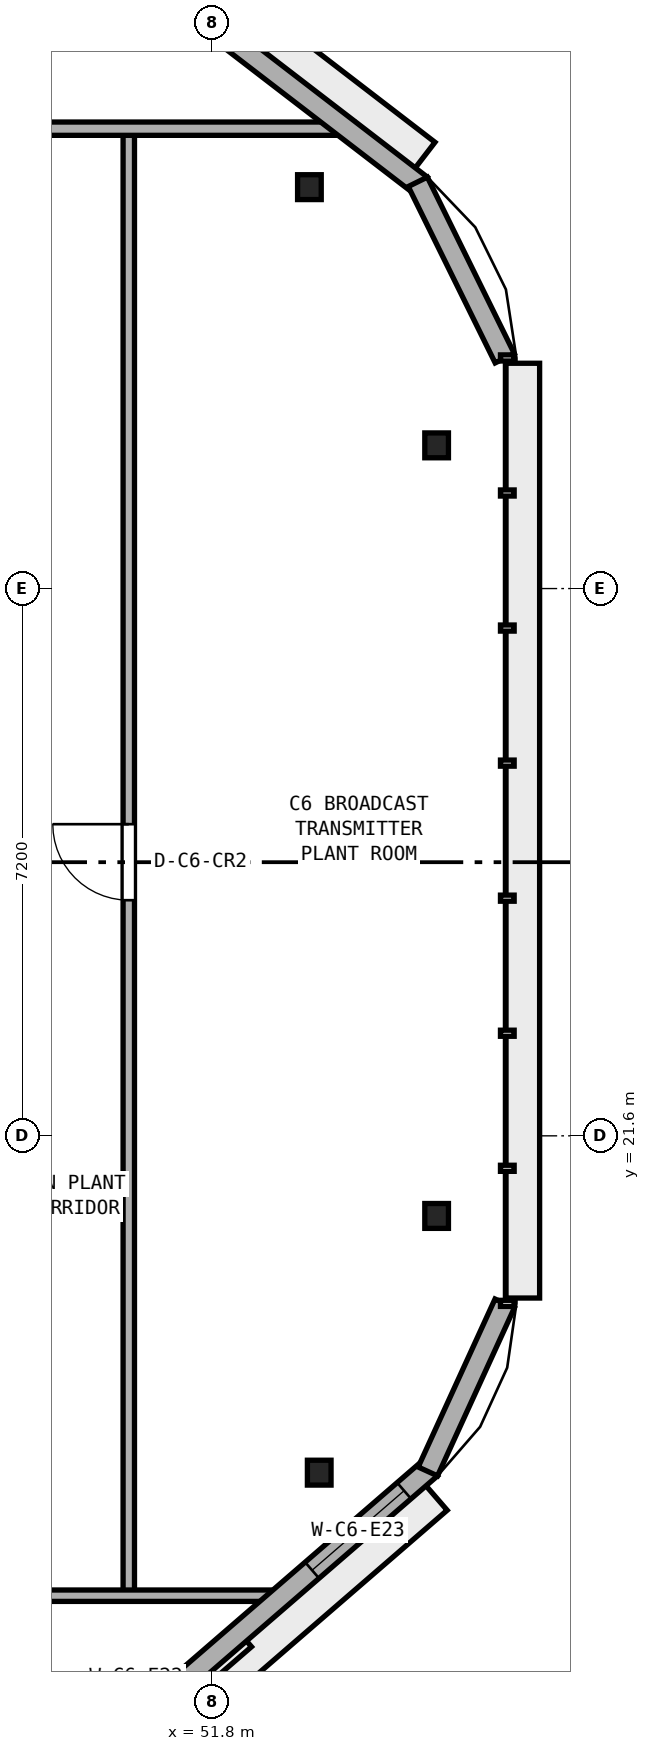
"""IFC4 building model, lengths in metres.
Left out: names, types, materials, properties, quantities, classifications, styles, units other than length and angle.
Written with IfcOpenShell. Run it as: python <this file> out.ifc"""

import sys

from ifc_helpers import new_model, si_unit, direction, frame, frame_2d, origin, origin_2d, place, context, subcontext, project, spatial, rectangle, i_section, extrude, element, fill, save


model = new_model("IFC4")
c1 = context("Model", 3, precision=1e-05, world=origin(), true_north=direction((0.0, 1.0)))
c2 = subcontext(c1, "Body", "Model", "MODEL_VIEW")
j1 = project(units=[si_unit("LENGTHUNIT", "METRE"), si_unit("PLANEANGLEUNIT", "RADIAN")], contexts=[c1])
p1 = place(None, origin())
s1 = spatial("IfcSite", under=j1, at=p1, CompositionType="ELEMENT")
p2 = place(p1, origin())
s2 = spatial("IfcBuilding", under=s1, at=p2, CompositionType="ELEMENT")
p3 = place(p2, frame((0.0, 0.0, 333.4)))
s3 = spatial("IfcBuildingStorey", under=s2, at=p3, CompositionType="ELEMENT", Elevation=333.4)
for number, where, z_axis, x_axis in (
    (1, (53.205, 17.169, 0.0), (0.0, 0.0, 1.0), (1.0, 0.0, 0.0)),
    (2, (54.75, 20.546, 0.0), (0.0, 0.0, 1.0), (1.0, 0.0, 0.0)),
    (3, (54.75, 30.684, 0.0), (0.0, 0.0, 1.0), (1.0, 0.0, 0.0)),
    (4, (53.076, 34.081, 0.0), (0.0, 0.0, 1.0), (1.0, 0.0, 0.0)),
):
    element("IfcColumn", number, at=place(p3, frame(where, z_axis=z_axis, x_axis=x_axis)), inside=s3, PredefinedType="COLUMN", context=c2, shape_type="SweptSolid", body=[
        extrude(i_section(OverallWidth=0.311, OverallDepth=0.327, WebThickness=0.016, FlangeThickness=0.025, at=origin_2d()), origin(), (0.0, 0.0, 1.0), 4.0),
    ])
p4 = place(p3, frame((50.7, 15.55, 0.0), z_axis=(0.0, 0.0, 1.0), x_axis=(0.0, 1.0, 0.0)))
e5 = element("IfcWall", 5, at=p4, inside=s3, PredefinedType="PARTITIONING", context=c2, shape_type="SweptSolid", body=[
    extrude(rectangle(XDim=19.3, YDim=0.15, at=frame_2d((9.65, 0.0))), origin(), (0.0, 0.0, 1.0), 3.7),
])
p5 = place(p4, frame((9.15, 0.0, 0.0)))
e6 = element("IfcOpeningElement", 6, at=p5, cuts=e5, PredefinedType="OPENING", context=c2, shape_type="SweptSolid", body=[
    extrude(rectangle(XDim=1.0, YDim=2.12, at=frame_2d((0.5, 1.06))), frame((0.0, 0.085, 0.0), z_axis=(0.0, -1.0, 0.0), x_axis=(1.0, 0.0, 0.0)), (0.0, 0.0, 1.0), 0.17),
])
p6 = place(p3, frame((28.818, 15.55, 0.0), z_axis=(0.0, 0.0, 1.0), x_axis=(1.0, 0.0, 0.0)))
e7 = element("IfcWall", 7, at=p6, inside=s3, PredefinedType="PARTITIONING", context=c2, shape_type="SweptSolid", body=[
    extrude(rectangle(XDim=23.98, YDim=0.15, at=frame_2d((11.99, 0.0))), origin(), (0.0, 0.0, 1.0), 3.7),
])
p7 = place(p6, frame((10.583, 0.0, 0.0)))
e8 = element("IfcOpeningElement", 8, at=p7, cuts=e7, PredefinedType="OPENING", context=c2, shape_type="SweptSolid", body=[
    extrude(rectangle(XDim=1.0, YDim=2.12, at=frame_2d((0.5, 1.06))), frame((0.0, 0.085, 0.0), z_axis=(0.0, -1.0, 0.0), x_axis=(1.0, 0.0, 0.0)), (0.0, 0.0, 1.0), 0.17),
])
p8 = place(p3, frame((29.236, 34.85, 0.0), z_axis=(0.0, 0.0, 1.0), x_axis=(1.0, 0.0, 0.0)))
e9 = element("IfcWall", 9, at=p8, inside=s3, PredefinedType="PARTITIONING", context=c2, shape_type="SweptSolid", body=[
    extrude(rectangle(XDim=24.422, YDim=0.175, at=frame_2d((12.211, 0.0))), origin(), (0.0, 0.0, 1.0), 3.7),
])
p9 = place(p8, frame((10.365, 0.0, 0.0)))
e10 = element("IfcOpeningElement", 10, at=p9, cuts=e9, PredefinedType="OPENING", context=c2, shape_type="SweptSolid", body=[
    extrude(rectangle(XDim=1.0, YDim=2.12, at=frame_2d((0.5, 1.06))), frame((0.0, 0.097, 0.0), z_axis=(0.0, -1.0, 0.0), x_axis=(1.0, 0.0, 0.0)), (0.0, 0.0, 1.0), 0.195),
])
p10 = place(p3, frame((46.921, 10.533, 0.0), z_axis=(0.0, 0.0, 1.0), x_axis=(0.756489047049, 0.654006362121, 0.0)))
e11 = element("IfcWall", 11, at=p10, inside=s3, PredefinedType="STANDARD", context=c2, shape_type="SweptSolid", body=[
    extrude(rectangle(XDim=10.244, YDim=0.28, at=frame_2d((5.122, 0.0))), origin(), (0.0, 0.0, 1.0), 3.7),
])
p11 = place(p10, frame((1.24, 0.0, 0.9)))
e12 = element("IfcOpeningElement", 12, at=p11, cuts=e11, PredefinedType="OPENING", context=c2, shape_type="SweptSolid", body=[
    extrude(rectangle(XDim=1.6, YDim=1.45, at=frame_2d((0.8, 0.725))), frame((0.0, 0.15, 0.0), z_axis=(0.0, -1.0, 0.0), x_axis=(1.0, 0.0, 0.0)), (0.0, 0.0, 1.0), 0.3),
])
p12 = place(p10, frame((4.322, 0.0, 0.9)))
e13 = element("IfcOpeningElement", 13, at=p12, cuts=e11, PredefinedType="OPENING", context=c2, shape_type="SweptSolid", body=[
    extrude(rectangle(XDim=1.6, YDim=1.45, at=frame_2d((0.8, 0.725))), frame((0.0, 0.15, 0.0), z_axis=(0.0, -1.0, 0.0), x_axis=(1.0, 0.0, 0.0)), (0.0, 0.0, 1.0), 0.3),
])
p13 = place(p10, frame((8.183, 0.0, 0.9)))
e14 = element("IfcOpeningElement", 14, at=p13, cuts=e11, PredefinedType="OPENING", context=c2, shape_type="SweptSolid", body=[
    extrude(rectangle(XDim=1.6, YDim=1.45, at=frame_2d((0.8, 0.725))), frame((0.0, 0.15, 0.0), z_axis=(0.0, -1.0, 0.0), x_axis=(1.0, 0.0, 0.0)), (0.0, 0.0, 1.0), 0.3),
])
p14 = place(p3, frame((54.543, 34.102, 0.0), z_axis=(0.0, 0.0, 1.0), x_axis=(-0.792926835332, 0.609316858302, 0.0)))
e15 = element("IfcWall", 15, at=p14, inside=s3, PredefinedType="STANDARD", context=c2, shape_type="SweptSolid", body=[
    extrude(rectangle(XDim=9.647, YDim=0.28, at=frame_2d((4.823, 0.0))), origin(), (0.0, 0.0, 1.0), 3.7),
])
p15 = place(p14, frame((4.023, 0.0, 0.9)))
e16 = element("IfcOpeningElement", 16, at=p15, cuts=e15, PredefinedType="OPENING", context=c2, shape_type="SweptSolid", body=[
    extrude(rectangle(XDim=1.6, YDim=1.45, at=frame_2d((0.8, 0.725))), frame((0.0, 0.15, 0.0), z_axis=(0.0, -1.0, 0.0), x_axis=(1.0, 0.0, 0.0)), (0.0, 0.0, 1.0), 0.3),
])
p16 = place(p14, frame((6.906, 0.0, 0.9)))
e17 = element("IfcOpeningElement", 17, at=p16, cuts=e15, PredefinedType="OPENING", context=c2, shape_type="SweptSolid", body=[
    extrude(rectangle(XDim=1.6, YDim=1.45, at=frame_2d((0.8, 0.725))), frame((0.0, 0.15, 0.0), z_axis=(0.0, -1.0, 0.0), x_axis=(1.0, 0.0, 0.0)), (0.0, 0.0, 1.0), 0.3),
])
p17 = place(p3, frame((54.635, 17.185, 0.0), z_axis=(0.0, 0.0, 1.0), x_axis=(0.415845215277, 0.909435405585, 0.0)))
e18 = element("IfcWall", 18, at=p17, inside=s3, PredefinedType="STANDARD", context=c2, shape_type="SweptSolid", body=[
    extrude(rectangle(XDim=2.431, YDim=0.28, at=frame_2d((1.215, 0.0))), origin(), (0.0, 0.0, 1.0), 3.7),
])
p18 = place(p3, frame((55.646, 31.83, 0.0), z_axis=(0.0, 0.0, 1.0), x_axis=(-0.441958643377, 0.89703542714, 0.0)))
e19 = element("IfcWall", 19, at=p18, inside=s3, PredefinedType="STANDARD", context=c2, shape_type="SweptSolid", body=[
    extrude(rectangle(XDim=2.587, YDim=0.28, at=frame_2d((1.293, 0.0))), origin(), (0.0, 0.0, 1.0), 3.7),
])
p19 = place(p5, origin())
e20 = element("IfcDoor", 20, at=p19, inside=s3, OperationType="SINGLE_SWING_RIGHT", PredefinedType="DOOR", context=c2, shape_type="SweptSolid", body=[
    extrude(rectangle(XDim=1.0, YDim=2.12, at=frame_2d((0.5, 1.06))), frame((0.0, 0.025, 0.0), z_axis=(0.0, -1.0, 0.0), x_axis=(1.0, 0.0, 0.0)), (0.0, 0.0, 1.0), 0.05),
])
fill(e6, e20)
p20 = place(p13, origin())
e21 = element("IfcWindow", 21, at=p20, inside=s3, PartitioningType="SINGLE_PANEL", PredefinedType="WINDOW", context=c2, shape_type="SweptSolid", body=[
    extrude(rectangle(XDim=1.6, YDim=1.45, at=frame_2d((0.8, 0.725))), frame((0.0, 0.03, 0.0), z_axis=(0.0, -1.0, 0.0), x_axis=(1.0, 0.0, 0.0)), (0.0, 0.0, 1.0), 0.06),
])
fill(e14, e21)
save(model, sys.argv[1])
